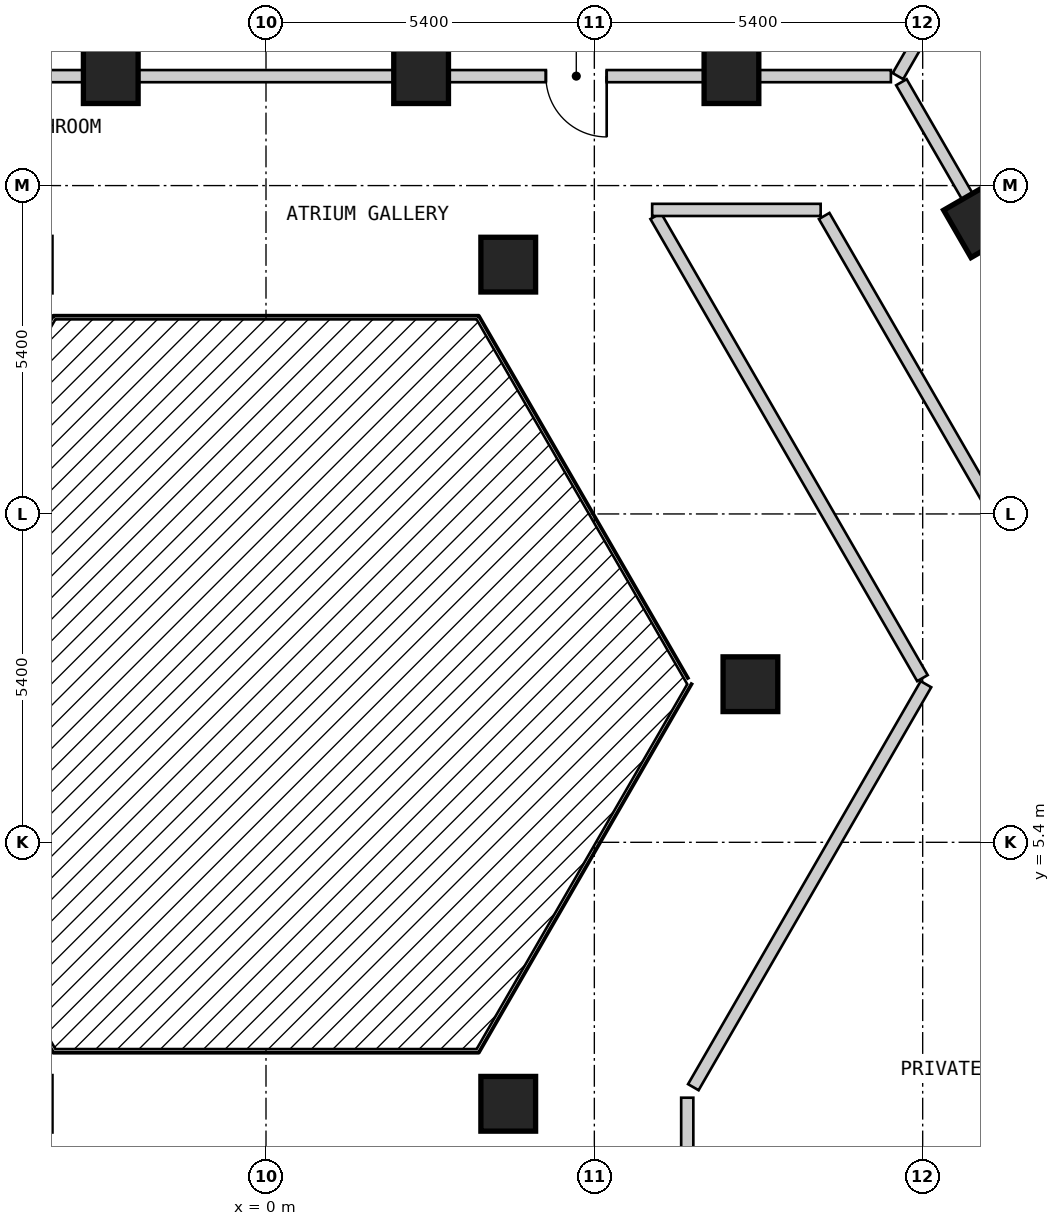
"""IFC4 building model, lengths in metres.
Left out: names, types, materials, properties, quantities, classifications, styles, units other than length and angle.
Written with IfcOpenShell. Run it as: python <this file> out.ifc"""

import sys

from ifc_helpers import new_model, si_unit, direction, frame, frame_2d, origin, origin_2d, place, context, subcontext, project, spatial, rectangle, extrude, element, fill, save


model = new_model("IFC4")
c1 = context("Model", 3, precision=1e-05, world=origin(), true_north=direction((0.0, 1.0)))
c2 = subcontext(c1, "Body", "Model", "MODEL_VIEW")
j1 = project(units=[si_unit("LENGTHUNIT", "METRE"), si_unit("PLANEANGLEUNIT", "RADIAN")], contexts=[c1])
p1 = place(None, origin())
s1 = spatial("IfcSite", under=j1, at=p1, CompositionType="ELEMENT")
p2 = place(p1, origin())
s2 = spatial("IfcBuilding", under=s1, at=p2, CompositionType="ELEMENT")
p3 = place(p2, frame((0.0, 0.0, 44.4)))
s3 = spatial("IfcBuildingStorey", under=s2, at=p3, CompositionType="ELEMENT", Elevation=44.4)
for number, where, z_axis, x_axis in (
    (1, (3.984, 1.1, 0.0), (0.0, 0.0, 1.0), (1.0, 0.0, 0.0)),
    (2, (7.967, 8.0, 0.0), (0.0, 0.0, 1.0), (1.0, 0.0, 0.0)),
    (3, (11.76, 15.631, 0.0), (0.0, 0.0, 1.0), (-0.5, 0.866, 0.0)),
    (4, (7.655, 18.0, 0.0), (0.0, 0.0, 1.0), (-1.0, 0.0, 0.0)),
    (5, (3.984, 14.9, 0.0), (0.0, 0.0, 1.0), (1.0, 0.0, 0.0)),
    (6, (2.551, 18.0, 0.0), (0.0, 0.0, 1.0), (-1.0, 0.0, 0.0)),
    (7, (-2.553, 18.0, 0.0), (0.0, 0.0, 1.0), (-1.0, 0.0, 0.0)),
):
    element("IfcColumn", number, at=place(p3, frame(where, z_axis=z_axis, x_axis=x_axis)), inside=s3, PredefinedType="COLUMN", context=c2, shape_type="SweptSolid", body=[
        extrude(rectangle(XDim=0.9, YDim=0.9, at=origin_2d()), origin(), (0.0, 0.0, 1.0), 3.0),
    ])
p4 = place(p3, frame((6.409, 15.7, 0.0), z_axis=(0.0, 0.0, 1.0), x_axis=(0.499930377127, -0.866065596838, 0.0)))
e8 = element("IfcWall", 8, at=p4, inside=s3, PredefinedType="PARTITIONING", context=c2, shape_type="SweptSolid", body=[
    extrude(rectangle(XDim=8.775, YDim=0.2, at=frame_2d((4.388, 0.0))), origin(), (0.0, 0.0, 1.0), 2.7),
])
p5 = place(p3, frame((9.18, 15.7, 0.0), z_axis=(0.0, 0.0, 1.0), x_axis=(0.500003652032, -0.866023295272, 0.0)))
e9 = element("IfcWall", 9, at=p5, inside=s3, PredefinedType="PARTITIONING", context=c2, shape_type="SweptSolid", body=[
    extrude(rectangle(XDim=18.012, YDim=0.2, at=frame_2d((9.006, 0.0))), origin(), (0.0, 0.0, 1.0), 2.7),
])
p6 = place(p5, frame((8.556, 0.0, 0.0)))
e10 = element("IfcOpeningElement", 10, at=p6, cuts=e9, PredefinedType="OPENING", context=c2, shape_type="SweptSolid", body=[
    extrude(rectangle(XDim=0.9, YDim=2.1, at=frame_2d((0.45, 1.05))), frame((0.0, 0.11, 0.0), z_axis=(0.0, -1.0, 0.0), x_axis=(1.0, 0.0, 0.0)), (0.0, 0.0, 1.0), 0.22),
])
p7 = place(p3, frame((10.45, 17.9, 0.0), z_axis=(0.0, 0.0, 1.0), x_axis=(0.500034352617, -0.866005569383, 0.0)))
e11 = element("IfcWall", 11, at=p7, inside=s3, PredefinedType="PARTITIONING", context=c2, shape_type="SweptSolid", body=[
    extrude(rectangle(XDim=20.553, YDim=0.2, at=frame_2d((10.276, 0.0))), origin(), (0.0, 0.0, 1.0), 2.7),
])
p8 = place(p7, frame((14.902, 0.0, 0.0)))
e12 = element("IfcOpeningElement", 12, at=p8, cuts=e11, PredefinedType="OPENING", context=c2, shape_type="SweptSolid", body=[
    extrude(rectangle(XDim=1.0, YDim=2.1, at=frame_2d((0.5, 1.05))), frame((0.0, 0.11, 0.0), z_axis=(0.0, -1.0, 0.0), x_axis=(1.0, 0.0, 0.0)), (0.0, 0.0, 1.0), 0.22),
])
p9 = place(p7, frame((4.671, 0.0, 0.0)))
e13 = element("IfcOpeningElement", 13, at=p9, cuts=e11, PredefinedType="OPENING", context=c2, shape_type="SweptSolid", body=[
    extrude(rectangle(XDim=1.0, YDim=2.1, at=frame_2d((0.5, 1.05))), frame((0.0, 0.11, 0.0), z_axis=(0.0, -1.0, 0.0), x_axis=(1.0, 0.0, 0.0)), (0.0, 0.0, 1.0), 0.22),
])
p10 = place(p3, frame((6.351, 15.8, 0.0), z_axis=(0.0, 0.0, 1.0), x_axis=(1.0, 0.0, 0.0)))
e14 = element("IfcWall", 14, at=p10, inside=s3, PredefinedType="PARTITIONING", context=c2, shape_type="SweptSolid", body=[
    extrude(rectangle(XDim=2.771, YDim=0.2, at=frame_2d((1.385, 0.0))), origin(), (0.0, 0.0, 1.0), 2.7),
])
p11 = place(p3, frame((-10.276, 18.0, 0.0), z_axis=(0.0, 0.0, 1.0), x_axis=(1.0, 0.0, 0.0)))
e15 = element("IfcWall", 15, at=p11, inside=s3, PredefinedType="PARTITIONING", context=c2, shape_type="SweptSolid", body=[
    extrude(rectangle(XDim=20.553, YDim=0.2, at=frame_2d((10.276, 0.0))), origin(), (0.0, 0.0, 1.0), 2.7),
])
p12 = place(p11, frame((14.879, 0.0, 0.0)))
e16 = element("IfcOpeningElement", 16, at=p12, cuts=e15, PredefinedType="OPENING", context=c2, shape_type="SweptSolid", body=[
    extrude(rectangle(XDim=1.0, YDim=2.1, at=frame_2d((0.5, 1.05))), frame((0.0, 0.11, 0.0), z_axis=(0.0, -1.0, 0.0), x_axis=(1.0, 0.0, 0.0)), (0.0, 0.0, 1.0), 0.22),
])
p13 = place(p11, frame((4.671, 0.0, 0.0)))
e17 = element("IfcOpeningElement", 17, at=p13, cuts=e15, PredefinedType="OPENING", context=c2, shape_type="SweptSolid", body=[
    extrude(rectangle(XDim=1.0, YDim=2.1, at=frame_2d((0.5, 1.05))), frame((0.0, 0.11, 0.0), z_axis=(0.0, -1.0, 0.0), x_axis=(1.0, 0.0, 0.0)), (0.0, 0.0, 1.0), 0.22),
])
p14 = place(p3, frame((7.028, 1.373, 0.0), z_axis=(0.0, 0.0, 1.0), x_axis=(0.49998574534, 0.86603363356, 0.0)))
e18 = element("IfcWall", 18, at=p14, inside=s3, PredefinedType="PARTITIONING", context=c2, shape_type="SweptSolid", body=[
    extrude(rectangle(XDim=7.652, YDim=0.2, at=frame_2d((3.826, 0.0))), origin(), (0.0, 0.0, 1.0), 2.7),
])
p15 = place(p3, frame((6.928, -2.8, 0.0), z_axis=(0.0, 0.0, 1.0), x_axis=(0.0, 1.0, 0.0)))
e19 = element("IfcWall", 19, at=p15, inside=s3, PredefinedType="PARTITIONING", context=c2, shape_type="SweptSolid", body=[
    extrude(rectangle(XDim=4.0, YDim=0.2, at=frame_2d((2.0, 0.0))), origin(), (0.0, 0.0, 1.0), 2.7),
])
p16 = place(p3, frame((7.655, 18.1, 0.0), z_axis=(0.0, 0.0, 1.0), x_axis=(0.0, 1.0, 0.0)))
e20 = element("IfcWall", 20, at=p16, inside=s3, PredefinedType="PARTITIONING", context=c2, shape_type="SweptSolid", body=[
    extrude(rectangle(XDim=4.1, YDim=0.1, at=frame_2d((2.05, 0.0))), origin(), (0.0, 0.0, 1.0), 2.7),
])
p17 = place(p16, frame((1.6, 0.0, 0.0)))
e21 = element("IfcOpeningElement", 21, at=p17, cuts=e20, PredefinedType="OPENING", context=c2, shape_type="SweptSolid", body=[
    extrude(rectangle(XDim=0.8, YDim=2.1, at=frame_2d((0.4, 1.05))), frame((0.0, 0.06, 0.0), z_axis=(0.0, -1.0, 0.0), x_axis=(1.0, 0.0, 0.0)), (0.0, 0.0, 1.0), 0.12),
])
p18 = place(p3, frame((2.551, 18.1, 0.0), z_axis=(0.0, 0.0, 1.0), x_axis=(0.0, 1.0, 0.0)))
e22 = element("IfcWall", 22, at=p18, inside=s3, PredefinedType="PARTITIONING", context=c2, shape_type="SweptSolid", body=[
    extrude(rectangle(XDim=4.1, YDim=0.1, at=frame_2d((2.05, 0.0))), origin(), (0.0, 0.0, 1.0), 2.7),
])
p19 = place(p18, frame((1.55, 0.0, 0.0)))
e23 = element("IfcOpeningElement", 23, at=p19, cuts=e22, PredefinedType="OPENING", context=c2, shape_type="SweptSolid", body=[
    extrude(rectangle(XDim=0.9, YDim=2.1, at=frame_2d((0.45, 1.05))), frame((0.0, 0.06, 0.0), z_axis=(0.0, -1.0, 0.0), x_axis=(1.0, 0.0, 0.0)), (0.0, 0.0, 1.0), 0.12),
])
p20 = place(p3, frame((10.393, 18.0, 0.0), z_axis=(0.0, 0.0, 1.0), x_axis=(0.499945497007, 0.866056868816, 0.0)))
e24 = element("IfcWall", 24, at=p20, inside=s3, PredefinedType="PARTITIONING", context=c2, shape_type="SweptSolid", body=[
    extrude(rectangle(XDim=10.265, YDim=0.2, at=frame_2d((5.132, 0.0))), origin(), (0.0, 0.0, 1.0), 2.7),
])
p21 = place(p3, frame((-2.553, 18.1, 0.0), z_axis=(0.0, 0.0, 1.0), x_axis=(0.0, 1.0, 0.0)))
e25 = element("IfcWall", 25, at=p21, inside=s3, PredefinedType="PARTITIONING", context=c2, shape_type="SweptSolid", body=[
    extrude(rectangle(XDim=10.0, YDim=0.2, at=frame_2d((5.0, 0.0))), origin(), (0.0, 0.0, 1.0), 2.7),
])
p22 = place(p12, origin())
e26 = element("IfcDoor", 26, at=p22, inside=s3, OperationType="SINGLE_SWING_RIGHT", PredefinedType="DOOR", context=c2, shape_type="SweptSolid", body=[
    extrude(rectangle(XDim=1.0, YDim=2.1, at=frame_2d((0.5, 1.05))), frame((0.0, 0.025, 0.0), z_axis=(0.0, -1.0, 0.0), x_axis=(1.0, 0.0, 0.0)), (0.0, 0.0, 1.0), 0.05),
])
fill(e16, e26)
save(model, sys.argv[1])
